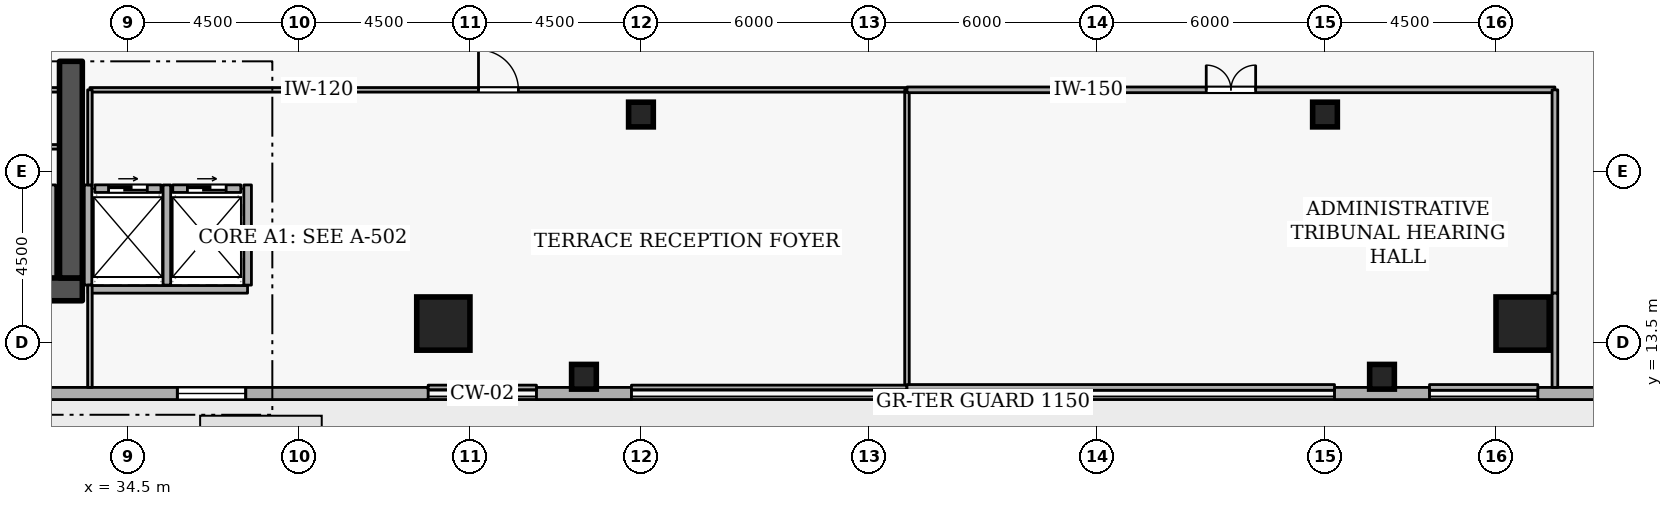
"""IFC4 building model, lengths in metres.
Left out: names, types, materials, properties, quantities, classifications, styles, units other than length and angle.
Written with IfcOpenShell. Run it as: python <this file> out.ifc"""

import sys

from ifc_helpers import new_model, si_unit, direction, frame, frame_2d, origin, origin_2d, place, context, subcontext, project, spatial, rectangle, extrude, element, fill, save


model = new_model("IFC4")
c1 = context("Model", 3, precision=1e-05, world=origin(), true_north=direction((0.0, 1.0)))
c2 = subcontext(c1, "Body", "Model", "MODEL_VIEW")
j1 = project(units=[si_unit("LENGTHUNIT", "METRE"), si_unit("PLANEANGLEUNIT", "RADIAN")], contexts=[c1])
p1 = place(None, origin())
s1 = spatial("IfcSite", under=j1, at=p1, CompositionType="ELEMENT")
p2 = place(p1, origin())
s2 = spatial("IfcBuilding", under=s1, at=p2, CompositionType="ELEMENT")
p3 = place(p2, frame((0.0, 0.0, 23.1)))
s3 = spatial("IfcBuildingStorey", under=s2, at=p3, CompositionType="ELEMENT", Elevation=23.1)
p4 = place(p3, frame((17.7, 14.9, 0.0), z_axis=(0.0, 0.0, 1.0), x_axis=(1.0, 0.0, 0.0)))
e1 = element("IfcWall", 1, at=p4, inside=s3, PredefinedType="SHEAR", context=c2, shape_type="SweptSolid", body=[
    extrude(rectangle(XDim=15.6, YDim=0.6, at=frame_2d((7.8, 0.0))), origin(), (0.0, 0.0, 1.0), 4.8),
])
p5 = place(p3, frame((33.0, 15.2, 0.0), z_axis=(0.0, 0.0, 1.0), x_axis=(0.0, 1.0, 0.0)))
e2 = element("IfcWall", 2, at=p5, inside=s3, PredefinedType="SHEAR", context=c2, shape_type="SweptSolid", body=[
    extrude(rectangle(XDim=5.7, YDim=0.6, at=frame_2d((2.85, 0.0))), origin(), (0.0, 0.0, 1.0), 4.8),
])
for number, where, z_axis, x_axis in (
    (3, (42.8, 14.0, 0.0), (0.0, 0.0, 1.0), (1.0, 0.0, 0.0)),
    (4, (71.2, 14.0, 0.0), (0.0, 0.0, 1.0), (1.0, 0.0, 0.0)),
):
    element("IfcColumn", number, at=place(p3, frame(where, z_axis=z_axis, x_axis=x_axis)), inside=s3, PredefinedType="COLUMN", context=c2, shape_type="SweptSolid", body=[
        extrude(rectangle(XDim=1.4, YDim=1.4, at=origin_2d()), origin(), (0.0, 0.0, 1.0), 4.8),
    ])
for number, where, z_axis, x_axis in (
    (5, (46.5, 12.6, 0.0), (0.0, 0.0, 1.0), (1.0, 0.0, 0.0)),
    (6, (67.5, 12.6, 0.0), (0.0, 0.0, 1.0), (1.0, 0.0, 0.0)),
    (7, (48.0, 19.5, 0.0), (0.0, 0.0, 1.0), (1.0, 0.0, 0.0)),
    (8, (66.0, 19.5, 0.0), (0.0, 0.0, 1.0), (1.0, 0.0, 0.0)),
):
    element("IfcColumn", number, at=place(p3, frame(where, z_axis=z_axis, x_axis=x_axis)), inside=s3, PredefinedType="COLUMN", context=c2, shape_type="SweptSolid", body=[
        extrude(rectangle(XDim=0.65, YDim=0.65, at=origin_2d()), origin(), (0.0, 0.0, 1.0), 4.8),
    ])
for number, where, z_axis, x_axis in (
    (9, (45.25, 12.16, 0.0), (0.0, 0.0, 1.0), (1.0, 0.0, 0.0)),
    (10, (66.25, 12.16, 0.0), (0.0, 0.0, 1.0), (1.0, 0.0, 0.0)),
):
    element("IfcWall", number, at=place(p3, frame(where, z_axis=z_axis, x_axis=x_axis)), inside=s3, PredefinedType="STANDARD", context=c2, shape_type="SweptSolid", body=[
        extrude(rectangle(XDim=2.5, YDim=0.32, at=frame_2d((1.25, 0.0))), origin(), (0.0, 0.0, 1.0), 2.84),
    ])
p6 = place(p3, frame((3.0, 12.16, 0.0), z_axis=(0.0, 0.0, 1.0), x_axis=(1.0, 0.0, 0.0)))
e11 = element("IfcWall", 11, at=p6, inside=s3, PredefinedType="STANDARD", context=c2, shape_type="SweptSolid", body=[
    extrude(rectangle(XDim=39.4, YDim=0.32, at=frame_2d((19.7, 0.0))), origin(), (0.0, 0.0, 1.0), 2.84),
])
p7 = place(p6, frame((6.2, 0.0, 0.0)))
e12 = element("IfcOpeningElement", 12, at=p7, cuts=e11, PredefinedType="OPENING", context=c2, shape_type="SweptSolid", body=[
    extrude(rectangle(XDim=1.15, YDim=2.1, at=frame_2d((0.575, 1.05))), frame((0.0, 0.17, 0.0), z_axis=(0.0, -1.0, 0.0), x_axis=(1.0, 0.0, 0.0)), (0.0, 0.0, 1.0), 0.34),
])
p8 = place(p6, frame((12.8, 0.0, 0.65)))
e13 = element("IfcOpeningElement", 13, at=p8, cuts=e11, PredefinedType="OPENING", context=c2, shape_type="SweptSolid", body=[
    extrude(rectangle(XDim=1.8, YDim=1.25, at=frame_2d((0.9, 0.625))), frame((0.0, 0.17, 0.0), z_axis=(0.0, -1.0, 0.0), x_axis=(1.0, 0.0, 0.0)), (0.0, 0.0, 1.0), 0.34),
])
p9 = place(p6, frame((32.8, 0.0, 0.65)))
e14 = element("IfcOpeningElement", 14, at=p9, cuts=e11, PredefinedType="OPENING", context=c2, shape_type="SweptSolid", body=[
    extrude(rectangle(XDim=1.8, YDim=1.25, at=frame_2d((0.9, 0.625))), frame((0.0, 0.17, 0.0), z_axis=(0.0, -1.0, 0.0), x_axis=(1.0, 0.0, 0.0)), (0.0, 0.0, 1.0), 0.34),
])
p10 = place(p3, frame((71.6, 12.16, 0.0), z_axis=(0.0, 0.0, 1.0), x_axis=(1.0, 0.0, 0.0)))
e15 = element("IfcWall", 15, at=p10, inside=s3, PredefinedType="STANDARD", context=c2, shape_type="SweptSolid", body=[
    extrude(rectangle(XDim=39.4, YDim=0.32, at=frame_2d((19.7, 0.0))), origin(), (0.0, 0.0, 1.0), 2.84),
])
p11 = place(p10, frame((13.5, 0.0, 0.0)))
e16 = element("IfcOpeningElement", 16, at=p11, cuts=e15, PredefinedType="OPENING", context=c2, shape_type="SweptSolid", body=[
    extrude(rectangle(XDim=1.15, YDim=2.1, at=frame_2d((0.575, 1.05))), frame((0.0, 0.17, 0.0), z_axis=(0.0, -1.0, 0.0), x_axis=(1.0, 0.0, 0.0)), (0.0, 0.0, 1.0), 0.34),
])
p12 = place(p10, frame((22.8, 0.0, 0.65)))
e17 = element("IfcOpeningElement", 17, at=p12, cuts=e15, PredefinedType="OPENING", context=c2, shape_type="SweptSolid", body=[
    extrude(rectangle(XDim=1.8, YDim=1.25, at=frame_2d((0.9, 0.625))), frame((0.0, 0.17, 0.0), z_axis=(0.0, -1.0, 0.0), x_axis=(1.0, 0.0, 0.0)), (0.0, 0.0, 1.0), 0.34),
])
p13 = place(p3, frame((33.63, 17.55, 0.0), z_axis=(0.0, 0.0, 1.0), x_axis=(1.0, 0.0, 0.0)))
e18 = element("IfcWall", 18, at=p13, inside=s3, PredefinedType="STANDARD", context=c2, shape_type="SweptSolid", body=[
    extrude(rectangle(XDim=1.74, YDim=0.2, at=frame_2d((0.87, 0.0))), origin(), (0.0, 0.0, 1.0), 4.54),
])
p14 = place(p13, frame((0.36, 0.0, 0.0)))
e19 = element("IfcOpeningElement", 19, at=p14, cuts=e18, PredefinedType="OPENING", context=c2, shape_type="SweptSolid", body=[
    extrude(rectangle(XDim=1.02, YDim=2.06, at=frame_2d((0.51, 1.03))), frame((0.0, 0.11, 0.0), z_axis=(0.0, -1.0, 0.0), x_axis=(1.0, 0.0, 0.0)), (0.0, 0.0, 1.0), 0.22),
])
p15 = place(p3, frame((35.68, 17.55, 0.0), z_axis=(0.0, 0.0, 1.0), x_axis=(1.0, 0.0, 0.0)))
e20 = element("IfcWall", 20, at=p15, inside=s3, PredefinedType="STANDARD", context=c2, shape_type="SweptSolid", body=[
    extrude(rectangle(XDim=1.79, YDim=0.2, at=frame_2d((0.895, 0.0))), origin(), (0.0, 0.0, 1.0), 4.54),
])
p16 = place(p15, frame((0.385, 0.0, 0.0)))
e21 = element("IfcOpeningElement", 21, at=p16, cuts=e20, PredefinedType="OPENING", context=c2, shape_type="SweptSolid", body=[
    extrude(rectangle(XDim=1.02, YDim=2.06, at=frame_2d((0.51, 1.03))), frame((0.0, 0.11, 0.0), z_axis=(0.0, -1.0, 0.0), x_axis=(1.0, 0.0, 0.0)), (0.0, 0.0, 1.0), 0.22),
])
p17 = place(p3, frame((32.5, 15.212, 0.0), z_axis=(0.0, 0.0, 1.0), x_axis=(0.0, 1.0, 0.0)))
e22 = element("IfcWall", 22, at=p17, inside=s3, PredefinedType="STANDARD", context=c2, shape_type="SweptSolid", body=[
    extrude(rectangle(XDim=2.436, YDim=0.2, at=frame_2d((1.218, 0.0))), origin(), (0.0, 0.0, 1.0), 4.54),
])
p18 = place(p3, frame((33.452, 14.9, 0.0), z_axis=(0.0, 0.0, 1.0), x_axis=(1.0, 0.0, 0.0)))
e23 = element("IfcWall", 23, at=p18, inside=s3, PredefinedType="STANDARD", context=c2, shape_type="SweptSolid", body=[
    extrude(rectangle(XDim=4.196, YDim=0.2, at=frame_2d((2.098, 0.0))), origin(), (0.0, 0.0, 1.0), 4.54),
])
for number, where, z_axis, x_axis in (
    (24, (35.525, 15.012, 0.0), (0.0, 0.0, 1.0), (0.0, 1.0, 0.0)),
    (25, (33.45, 15.012, 0.0), (0.0, 0.0, 1.0), (0.0, 1.0, 0.0)),
    (26, (37.65, 15.012, 0.0), (0.0, 0.0, 1.0), (0.0, 1.0, 0.0)),
):
    element("IfcWall", number, at=place(p3, frame(where, z_axis=z_axis, x_axis=x_axis)), inside=s3, PredefinedType="STANDARD", context=c2, shape_type="SweptSolid", body=[
        extrude(rectangle(XDim=2.636, YDim=0.2, at=frame_2d((1.318, 0.0))), origin(), (0.0, 0.0, 1.0), 4.54),
    ])
p19 = place(p3, frame((32.7, 18.65, 0.0), z_axis=(0.0, 0.0, 1.0), x_axis=(-1.0, 0.0, 0.0)))
e27 = element("IfcWall", 27, at=p19, inside=s3, PredefinedType="PARTITIONING", context=c2, shape_type="SweptSolid", body=[
    extrude(rectangle(XDim=2.1, YDim=0.12, at=frame_2d((1.05, 0.0))), origin(), (0.0, 0.0, 1.0), 4.54),
])
p20 = place(p3, frame((30.6, 20.15, 0.0), z_axis=(0.0, 0.0, 1.0), x_axis=(1.0, 0.0, 0.0)))
e28 = element("IfcWall", 28, at=p20, inside=s3, PredefinedType="PARTITIONING", context=c2, shape_type="SweptSolid", body=[
    extrude(rectangle(XDim=2.1, YDim=0.12, at=frame_2d((1.05, 0.0))), origin(), (0.0, 0.0, 1.0), 4.54),
])
p21 = place(p20, frame((0.575, 0.0, 0.0)))
e29 = element("IfcOpeningElement", 29, at=p21, cuts=e28, PredefinedType="OPENING", context=c2, shape_type="SweptSolid", body=[
    extrude(rectangle(XDim=0.95, YDim=2.1, at=frame_2d((0.475, 1.05))), frame((0.0, 0.07, 0.0), z_axis=(0.0, -1.0, 0.0), x_axis=(1.0, 0.0, 0.0)), (0.0, 0.0, 1.0), 0.14),
])
p22 = place(p3, frame((33.5, 20.15, 0.0), z_axis=(0.0, 0.0, 1.0), x_axis=(1.0, 0.0, 0.0)))
e30 = element("IfcWall", 30, at=p22, inside=s3, PredefinedType="PARTITIONING", context=c2, shape_type="SweptSolid", body=[
    extrude(rectangle(XDim=21.5, YDim=0.12, at=frame_2d((10.75, 0.0))), origin(), (0.0, 0.0, 1.0), 4.54),
])
p23 = place(p22, frame((10.225, 0.0, 0.0)))
e31 = element("IfcOpeningElement", 31, at=p23, cuts=e30, PredefinedType="OPENING", context=c2, shape_type="SweptSolid", body=[
    extrude(rectangle(XDim=1.05, YDim=2.1, at=frame_2d((0.525, 1.05))), frame((0.0, 0.07, 0.0), z_axis=(0.0, -1.0, 0.0), x_axis=(1.0, 0.0, 0.0)), (0.0, 0.0, 1.0), 0.14),
])
p24 = place(p3, frame((55.0, 20.15, 0.0), z_axis=(0.0, 0.0, 1.0), x_axis=(0.0, -1.0, 0.0)))
e32 = element("IfcWall", 32, at=p24, inside=s3, PredefinedType="PARTITIONING", context=c2, shape_type="SweptSolid", body=[
    extrude(rectangle(XDim=7.83, YDim=0.12, at=frame_2d((3.915, 0.0))), origin(), (0.0, 0.0, 1.0), 4.54),
])
p25 = place(p3, frame((55.0, 12.32, 0.0), z_axis=(0.0, 0.0, 1.0), x_axis=(-1.0, 0.0, 0.0)))
e33 = element("IfcWall", 33, at=p25, inside=s3, PredefinedType="PARTITIONING", context=c2, shape_type="SweptSolid", body=[
    extrude(rectangle(XDim=7.25, YDim=0.12, at=frame_2d((3.625, 0.0))), origin(), (0.0, 0.0, 1.0), 4.54),
])
p26 = place(p3, frame((45.25, 12.32, 0.0), z_axis=(0.0, 0.0, 1.0), x_axis=(-1.0, 0.0, 0.0)))
e34 = element("IfcWall", 34, at=p26, inside=s3, PredefinedType="PARTITIONING", context=c2, shape_type="SweptSolid", body=[
    extrude(rectangle(XDim=2.85, YDim=0.12, at=frame_2d((1.425, 0.0))), origin(), (0.0, 0.0, 1.0), 4.54),
])
p27 = place(p3, frame((33.5, 12.32, 0.0), z_axis=(0.0, 0.0, 1.0), x_axis=(0.0, 1.0, 0.0)))
e35 = element("IfcWall", 35, at=p27, inside=s3, PredefinedType="PARTITIONING", context=c2, shape_type="SweptSolid", body=[
    extrude(rectangle(XDim=2.692, YDim=0.12, at=frame_2d((1.346, 0.0))), origin(), (0.0, 0.0, 1.0), 4.54),
])
p28 = place(p3, frame((33.5, 17.648, 0.0), z_axis=(0.0, 0.0, 1.0), x_axis=(0.0, 1.0, 0.0)))
e36 = element("IfcWall", 36, at=p28, inside=s3, PredefinedType="PARTITIONING", context=c2, shape_type="SweptSolid", body=[
    extrude(rectangle(XDim=2.502, YDim=0.12, at=frame_2d((1.251, 0.0))), origin(), (0.0, 0.0, 1.0), 4.54),
])
p29 = place(p3, frame((55.0, 20.15, 0.0), z_axis=(0.0, 0.0, 1.0), x_axis=(1.0, 0.0, 0.0)))
e37 = element("IfcWall", 37, at=p29, inside=s3, PredefinedType="PARTITIONING", context=c2, shape_type="SweptSolid", body=[
    extrude(rectangle(XDim=17.05, YDim=0.15, at=frame_2d((8.525, 0.0))), origin(), (0.0, 0.0, 1.0), 4.54),
])
p30 = place(p29, frame((7.875, 0.0, 0.0)))
e38 = element("IfcOpeningElement", 38, at=p30, cuts=e37, PredefinedType="OPENING", context=c2, shape_type="SweptSolid", body=[
    extrude(rectangle(XDim=1.3, YDim=2.12, at=frame_2d((0.65, 1.06))), frame((0.0, 0.085, 0.0), z_axis=(0.0, -1.0, 0.0), x_axis=(1.0, 0.0, 0.0)), (0.0, 0.0, 1.0), 0.17),
])
p31 = place(p3, frame((72.05, 20.15, 0.0), z_axis=(0.0, 0.0, 1.0), x_axis=(0.0, -1.0, 0.0)))
e39 = element("IfcWall", 39, at=p31, inside=s3, PredefinedType="PARTITIONING", context=c2, shape_type="SweptSolid", body=[
    extrude(rectangle(XDim=5.35, YDim=0.15, at=frame_2d((2.675, 0.0))), origin(), (0.0, 0.0, 1.0), 4.54),
])
p32 = place(p3, frame((72.05, 14.8, 0.0), z_axis=(0.0, 0.0, 1.0), x_axis=(0.0, -1.0, 0.0)))
e40 = element("IfcWall", 40, at=p32, inside=s3, PredefinedType="PARTITIONING", context=c2, shape_type="SweptSolid", body=[
    extrude(rectangle(XDim=2.48, YDim=0.15, at=frame_2d((1.24, 0.0))), origin(), (0.0, 0.0, 1.0), 4.54),
])
p33 = place(p3, frame((71.6, 12.32, 0.0), z_axis=(0.0, 0.0, 1.0), x_axis=(-1.0, 0.0, 0.0)))
e41 = element("IfcWall", 41, at=p33, inside=s3, PredefinedType="PARTITIONING", context=c2, shape_type="SweptSolid", body=[
    extrude(rectangle(XDim=2.85, YDim=0.15, at=frame_2d((1.425, 0.0))), origin(), (0.0, 0.0, 1.0), 4.54),
])
p34 = place(p3, frame((66.25, 12.32, 0.0), z_axis=(0.0, 0.0, 1.0), x_axis=(-1.0, 0.0, 0.0)))
e42 = element("IfcWall", 42, at=p34, inside=s3, PredefinedType="PARTITIONING", context=c2, shape_type="SweptSolid", body=[
    extrude(rectangle(XDim=11.25, YDim=0.15, at=frame_2d((5.625, 0.0))), origin(), (0.0, 0.0, 1.0), 4.54),
])
p35 = place(p9, origin())
e43 = element("IfcWindow", 43, at=p35, inside=s3, PartitioningType="SINGLE_PANEL", PredefinedType="WINDOW", context=c2, shape_type="SweptSolid", body=[
    extrude(rectangle(XDim=1.8, YDim=1.25, at=frame_2d((0.9, 0.625))), frame((0.0, 0.03, 0.0), z_axis=(0.0, -1.0, 0.0), x_axis=(1.0, 0.0, 0.0)), (0.0, 0.0, 1.0), 0.06),
])
fill(e14, e43)
p36 = place(p14, origin())
e44 = element("IfcDoor", 44, at=p36, inside=s3, OperationType="SLIDING_TO_LEFT", PredefinedType="DOOR", context=c2, shape_type="SweptSolid", body=[
    extrude(rectangle(XDim=1.02, YDim=2.06, at=frame_2d((0.51, 1.03))), frame((0.0, 0.025, 0.0), z_axis=(0.0, -1.0, 0.0), x_axis=(1.0, 0.0, 0.0)), (0.0, 0.0, 1.0), 0.05),
])
fill(e19, e44)
p37 = place(p16, origin())
e45 = element("IfcDoor", 45, at=p37, inside=s3, OperationType="SLIDING_TO_LEFT", PredefinedType="DOOR", context=c2, shape_type="SweptSolid", body=[
    extrude(rectangle(XDim=1.02, YDim=2.06, at=frame_2d((0.51, 1.03))), frame((0.0, 0.025, 0.0), z_axis=(0.0, -1.0, 0.0), x_axis=(1.0, 0.0, 0.0)), (0.0, 0.0, 1.0), 0.05),
])
fill(e21, e45)
p38 = place(p23, origin())
e46 = element("IfcDoor", 46, at=p38, inside=s3, OperationType="SINGLE_SWING_LEFT", PredefinedType="DOOR", context=c2, shape_type="SweptSolid", body=[
    extrude(rectangle(XDim=1.05, YDim=2.1, at=frame_2d((0.525, 1.05))), frame((0.0, 0.025, 0.0), z_axis=(0.0, -1.0, 0.0), x_axis=(1.0, 0.0, 0.0)), (0.0, 0.0, 1.0), 0.05),
])
fill(e31, e46)
p39 = place(p30, origin())
e47 = element("IfcDoor", 47, at=p39, inside=s3, OperationType="DOUBLE_DOOR_SINGLE_SWING", PredefinedType="DOOR", context=c2, shape_type="SweptSolid", body=[
    extrude(rectangle(XDim=1.3, YDim=2.12, at=frame_2d((0.65, 1.06))), frame((0.0, 0.025, 0.0), z_axis=(0.0, -1.0, 0.0), x_axis=(1.0, 0.0, 0.0)), (0.0, 0.0, 1.0), 0.05),
])
fill(e38, e47)
save(model, sys.argv[1])
